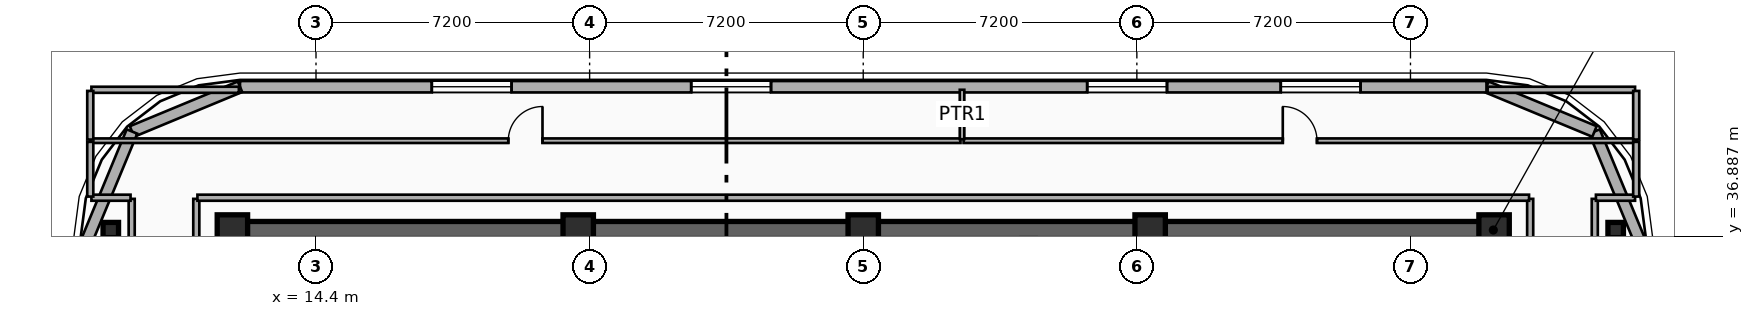
"""IFC4 building model, lengths in metres.
Left out: names, types, materials, properties, quantities, classifications, styles, units other than length and angle.
Written with IfcOpenShell. Run it as: python <this file> out.ifc"""

import sys

from ifc_helpers import new_model, si_unit, direction, frame, frame_2d, origin, origin_2d, place, context, subcontext, project, spatial, rectangle, i_section, extrude, element, fill, save


model = new_model("IFC4")
c1 = context("Model", 3, precision=1e-05, world=origin(), true_north=direction((0.0, 1.0)))
c2 = subcontext(c1, "Body", "Model", "MODEL_VIEW")
j1 = project(units=[si_unit("LENGTHUNIT", "METRE"), si_unit("PLANEANGLEUNIT", "RADIAN")], contexts=[c1])
p1 = place(None, origin())
s1 = spatial("IfcSite", under=j1, at=p1, CompositionType="ELEMENT")
p2 = place(p1, origin())
s2 = spatial("IfcBuilding", under=s1, at=p2, CompositionType="ELEMENT")
p3 = place(p2, frame((0.0, 0.0, 269.5)))
s3 = spatial("IfcBuildingStorey", under=s2, at=p3, CompositionType="ELEMENT", Elevation=269.5)
p4 = place(p3, frame((12.15, 37.05, 0.0), z_axis=(0.0, 0.0, 1.0), x_axis=(1.0, 0.0, 0.0)))
e1 = element("IfcWall", 1, at=p4, inside=s3, PredefinedType="SHEAR", context=c2, shape_type="SweptSolid", body=[
    extrude(rectangle(XDim=33.23, YDim=0.45, at=frame_2d((16.615, 0.0))), origin(), (0.0, 0.0, 1.0), 3.7),
])
for number, where, z_axis, x_axis in (
    (2, (12.2, 37.05, 0.0), (0.0, 0.0, 1.0), (1.0, 0.0, 0.0)),
    (3, (21.3, 37.05, 0.0), (0.0, 0.0, 1.0), (1.0, 0.0, 0.0)),
    (4, (28.8, 37.05, 0.0), (0.0, 0.0, 1.0), (1.0, 0.0, 0.0)),
    (5, (36.35, 37.05, 0.0), (0.0, 0.0, 1.0), (1.0, 0.0, 0.0)),
    (6, (45.4, 37.05, 0.0), (0.0, 0.0, 1.0), (1.0, 0.0, 0.0)),
):
    element("IfcColumn", number, at=place(p3, frame(where, z_axis=z_axis, x_axis=x_axis)), inside=s3, PredefinedType="COLUMN", context=c2, shape_type="SweptSolid", body=[
        extrude(rectangle(XDim=0.8, YDim=0.8, at=origin_2d()), origin(), (0.0, 0.0, 1.0), 3.7),
    ])
for number, where, z_axis, x_axis in (
    (7, (9.0, 37.05, 0.0), (0.0, 0.0, 1.0), (1.0, 0.0, 0.0)),
    (8, (48.6, 37.05, 0.0), (0.0, 0.0, 1.0), (1.0, 0.0, 0.0)),
):
    element("IfcColumn", number, at=place(p3, frame(where, z_axis=z_axis, x_axis=x_axis)), inside=s3, PredefinedType="COLUMN", context=c2, shape_type="SweptSolid", body=[
        extrude(i_section(OverallWidth=0.408, OverallDepth=0.4, WebThickness=0.025, FlangeThickness=0.039, FilletRadius=0.015, at=origin_2d()), origin(), (0.0, 0.0, 1.0), 3.7),
    ])
for number, where, z_axis, x_axis in (
    (9, (48.042, 39.643, 0.0), (0.0, 0.0, 1.0), (0.383, -0.924, 0.0)),
    (10, (45.2, 40.82, 0.0), (0.0, 0.0, 1.0), (0.924, -0.383, 0.0)),
):
    element("IfcWall", number, at=place(p3, frame(where, z_axis=z_axis, x_axis=x_axis)), inside=s3, PredefinedType="SOLIDWALL", context=c2, shape_type="SweptSolid", body=[
        extrude(rectangle(XDim=3.077, YDim=0.3, at=frame_2d((1.538, 0.0))), origin(), (0.0, 0.0, 1.0), 3.42),
    ])
p5 = place(p3, frame((12.4, 40.82, 0.0), z_axis=(0.0, 0.0, 1.0), x_axis=(1.0, 0.0, 0.0)))
e11 = element("IfcWall", 11, at=p5, inside=s3, PredefinedType="SOLIDWALL", context=c2, shape_type="SweptSolid", body=[
    extrude(rectangle(XDim=32.8, YDim=0.3, at=frame_2d((16.4, 0.0))), origin(), (0.0, 0.0, 1.0), 3.42),
])
p6 = place(p5, frame((5.047, 0.0, 0.75)))
e12 = element("IfcOpeningElement", 12, at=p6, cuts=e11, PredefinedType="OPENING", context=c2, shape_type="SweptSolid", body=[
    extrude(rectangle(XDim=2.1, YDim=2.1, at=frame_2d((1.05, 1.05))), frame((0.0, 0.16, 0.0), z_axis=(0.0, -1.0, 0.0), x_axis=(1.0, 0.0, 0.0)), (0.0, 0.0, 1.0), 0.32),
])
p7 = place(p5, frame((11.873, 0.0, 0.75)))
e13 = element("IfcOpeningElement", 13, at=p7, cuts=e11, PredefinedType="OPENING", context=c2, shape_type="SweptSolid", body=[
    extrude(rectangle(XDim=2.1, YDim=2.1, at=frame_2d((1.05, 1.05))), frame((0.0, 0.16, 0.0), z_axis=(0.0, -1.0, 0.0), x_axis=(1.0, 0.0, 0.0)), (0.0, 0.0, 1.0), 0.32),
])
p8 = place(p5, frame((22.293, 0.0, 0.75)))
e14 = element("IfcOpeningElement", 14, at=p8, cuts=e11, PredefinedType="OPENING", context=c2, shape_type="SweptSolid", body=[
    extrude(rectangle(XDim=2.1, YDim=2.1, at=frame_2d((1.05, 1.05))), frame((0.0, 0.16, 0.0), z_axis=(0.0, -1.0, 0.0), x_axis=(1.0, 0.0, 0.0)), (0.0, 0.0, 1.0), 0.32),
])
p9 = place(p5, frame((27.387, 0.0, 0.75)))
e15 = element("IfcOpeningElement", 15, at=p9, cuts=e11, PredefinedType="OPENING", context=c2, shape_type="SweptSolid", body=[
    extrude(rectangle(XDim=2.1, YDim=2.1, at=frame_2d((1.05, 1.05))), frame((0.0, 0.16, 0.0), z_axis=(0.0, -1.0, 0.0), x_axis=(1.0, 0.0, 0.0)), (0.0, 0.0, 1.0), 0.32),
])
for number, where, z_axis, x_axis in (
    (16, (9.557, 39.643, 0.0), (0.0, 0.0, 1.0), (0.924, 0.383, 0.0)),
    (17, (8.38, 36.8, 0.0), (0.0, 0.0, 1.0), (0.383, 0.924, 0.0)),
):
    element("IfcWall", number, at=place(p3, frame(where, z_axis=z_axis, x_axis=x_axis)), inside=s3, PredefinedType="SOLIDWALL", context=c2, shape_type="SweptSolid", body=[
        extrude(rectangle(XDim=3.077, YDim=0.3, at=frame_2d((1.538, 0.0))), origin(), (0.0, 0.0, 1.0), 3.42),
    ])
p10 = place(p3, frame((8.46, 39.4, 0.0), z_axis=(0.0, 0.0, 1.0), x_axis=(1.0, 0.0, 0.0)))
e18 = element("IfcWall", 18, at=p10, inside=s3, PredefinedType="PARTITIONING", context=c2, shape_type="SweptSolid", body=[
    extrude(rectangle(XDim=22.9, YDim=0.12, at=frame_2d((11.45, 0.0))), origin(), (0.0, 0.0, 1.0), 3.42),
])
p11 = place(p10, frame((11.0, 0.0, 0.0)))
e19 = element("IfcOpeningElement", 19, at=p11, cuts=e18, PredefinedType="OPENING", context=c2, shape_type="SweptSolid", body=[
    extrude(rectangle(XDim=0.9, YDim=2.1, at=frame_2d((0.45, 1.05))), frame((0.0, 0.07, 0.0), z_axis=(0.0, -1.0, 0.0), x_axis=(1.0, 0.0, 0.0)), (0.0, 0.0, 1.0), 0.14),
])
p12 = place(p3, frame((31.44, 39.4, 0.0), z_axis=(0.0, 0.0, 1.0), x_axis=(1.0, 0.0, 0.0)))
e20 = element("IfcWall", 20, at=p12, inside=s3, PredefinedType="PARTITIONING", context=c2, shape_type="SweptSolid", body=[
    extrude(rectangle(XDim=17.7, YDim=0.12, at=frame_2d((8.85, 0.0))), origin(), (0.0, 0.0, 1.0), 3.42),
])
p13 = place(p12, frame((8.4, 0.0, 0.0)))
e21 = element("IfcOpeningElement", 21, at=p13, cuts=e20, PredefinedType="OPENING", context=c2, shape_type="SweptSolid", body=[
    extrude(rectangle(XDim=0.9, YDim=2.1, at=frame_2d((0.45, 1.05))), frame((0.0, 0.07, 0.0), z_axis=(0.0, -1.0, 0.0), x_axis=(1.0, 0.0, 0.0)), (0.0, 0.0, 1.0), 0.14),
])
p14 = place(p3, frame((31.4, 39.44, 0.0), z_axis=(0.0, 0.0, 1.0), x_axis=(0.0, 1.0, 0.0)))
e22 = element("IfcWall", 22, at=p14, inside=s3, PredefinedType="PARTITIONING", context=c2, shape_type="SweptSolid", body=[
    extrude(rectangle(XDim=1.3, YDim=0.12, at=frame_2d((0.65, 0.0))), origin(), (0.0, 0.0, 1.0), 3.42),
])
for number, where, z_axis, x_axis in (
    (23, (9.55, 27.63, 0.0), (0.0, 0.0, 1.0), (0.0, 1.0, 0.0)),
    (24, (11.25, 27.63, 0.0), (0.0, 0.0, 1.0), (0.0, 1.0, 0.0)),
    (25, (46.35, 27.63, 0.0), (0.0, 0.0, 1.0), (0.0, 1.0, 0.0)),
    (26, (48.05, 27.63, 0.0), (0.0, 0.0, 1.0), (0.0, 1.0, 0.0)),
):
    element("IfcWall", number, at=place(p3, frame(where, z_axis=z_axis, x_axis=x_axis)), inside=s3, PredefinedType="PARTITIONING", context=c2, shape_type="SweptSolid", body=[
        extrude(rectangle(XDim=10.24, YDim=0.16, at=frame_2d((5.12, 0.0))), origin(), (0.0, 0.0, 1.0), 2.9),
    ])
p15 = place(p3, frame((8.49, 37.9, 0.0), z_axis=(0.0, 0.0, 1.0), x_axis=(1.0, 0.0, 0.0)))
e27 = element("IfcWall", 27, at=p15, inside=s3, PredefinedType="PARTITIONING", context=c2, shape_type="SweptSolid", body=[
    extrude(rectangle(XDim=1.03, YDim=0.16, at=frame_2d((0.515, 0.0))), origin(), (0.0, 0.0, 1.0), 3.42),
])
p16 = place(p3, frame((11.28, 37.9, 0.0), z_axis=(0.0, 0.0, 1.0), x_axis=(1.0, 0.0, 0.0)))
e28 = element("IfcWall", 28, at=p16, inside=s3, PredefinedType="PARTITIONING", context=c2, shape_type="SweptSolid", body=[
    extrude(rectangle(XDim=35.04, YDim=0.16, at=frame_2d((17.52, 0.0))), origin(), (0.0, 0.0, 1.0), 3.42),
])
p17 = place(p3, frame((48.08, 37.9, 0.0), z_axis=(0.0, 0.0, 1.0), x_axis=(1.0, 0.0, 0.0)))
e29 = element("IfcWall", 29, at=p17, inside=s3, PredefinedType="PARTITIONING", context=c2, shape_type="SweptSolid", body=[
    extrude(rectangle(XDim=1.03, YDim=0.16, at=frame_2d((0.515, 0.0))), origin(), (0.0, 0.0, 1.0), 3.42),
])
for number, where, z_axis, x_axis in (
    (30, (8.46, 37.93, 0.0), (0.0, 0.0, 1.0), (0.0, 1.0, 0.0)),
    (31, (49.14, 37.93, 0.0), (0.0, 0.0, 1.0), (0.0, 1.0, 0.0)),
):
    element("IfcWall", number, at=place(p3, frame(where, z_axis=z_axis, x_axis=x_axis)), inside=s3, PredefinedType="PARTITIONING", context=c2, shape_type="SweptSolid", body=[
        extrude(rectangle(XDim=1.44, YDim=0.16, at=frame_2d((0.72, 0.0))), origin(), (0.0, 0.0, 1.0), 3.42),
    ])
p18 = place(p3, frame((8.49, 40.74, 0.0), z_axis=(0.0, 0.0, 1.0), x_axis=(1.0, 0.0, 0.0)))
e32 = element("IfcWall", 32, at=p18, inside=s3, PredefinedType="PARTITIONING", context=c2, shape_type="SweptSolid", body=[
    extrude(rectangle(XDim=3.88, YDim=0.16, at=frame_2d((1.94, 0.0))), origin(), (0.0, 0.0, 1.0), 3.42),
])
p19 = place(p3, frame((8.46, 39.43, 0.0), z_axis=(0.0, 0.0, 1.0), x_axis=(0.0, 1.0, 0.0)))
e33 = element("IfcWall", 33, at=p19, inside=s3, PredefinedType="PARTITIONING", context=c2, shape_type="SweptSolid", body=[
    extrude(rectangle(XDim=1.28, YDim=0.16, at=frame_2d((0.64, 0.0))), origin(), (0.0, 0.0, 1.0), 3.42),
])
p20 = place(p3, frame((45.23, 40.74, 0.0), z_axis=(0.0, 0.0, 1.0), x_axis=(1.0, 0.0, 0.0)))
e34 = element("IfcWall", 34, at=p20, inside=s3, PredefinedType="PARTITIONING", context=c2, shape_type="SweptSolid", body=[
    extrude(rectangle(XDim=3.88, YDim=0.16, at=frame_2d((1.94, 0.0))), origin(), (0.0, 0.0, 1.0), 3.42),
])
p21 = place(p3, frame((49.14, 39.43, 0.0), z_axis=(0.0, 0.0, 1.0), x_axis=(0.0, 1.0, 0.0)))
e35 = element("IfcWall", 35, at=p21, inside=s3, PredefinedType="PARTITIONING", context=c2, shape_type="SweptSolid", body=[
    extrude(rectangle(XDim=1.28, YDim=0.16, at=frame_2d((0.64, 0.0))), origin(), (0.0, 0.0, 1.0), 3.42),
])
p22 = place(p6, origin())
e36 = element("IfcWindow", 36, at=p22, inside=s3, PartitioningType="SINGLE_PANEL", PredefinedType="WINDOW", context=c2, shape_type="SweptSolid", body=[
    extrude(rectangle(XDim=2.1, YDim=2.1, at=frame_2d((1.05, 1.05))), frame((0.0, 0.03, 0.0), z_axis=(0.0, -1.0, 0.0), x_axis=(1.0, 0.0, 0.0)), (0.0, 0.0, 1.0), 0.06),
])
fill(e12, e36)
p23 = place(p7, origin())
e37 = element("IfcWindow", 37, at=p23, inside=s3, PartitioningType="SINGLE_PANEL", PredefinedType="WINDOW", context=c2, shape_type="SweptSolid", body=[
    extrude(rectangle(XDim=2.1, YDim=2.1, at=frame_2d((1.05, 1.05))), frame((0.0, 0.03, 0.0), z_axis=(0.0, -1.0, 0.0), x_axis=(1.0, 0.0, 0.0)), (0.0, 0.0, 1.0), 0.06),
])
fill(e13, e37)
p24 = place(p8, origin())
e38 = element("IfcWindow", 38, at=p24, inside=s3, PartitioningType="SINGLE_PANEL", PredefinedType="WINDOW", context=c2, shape_type="SweptSolid", body=[
    extrude(rectangle(XDim=2.1, YDim=2.1, at=frame_2d((1.05, 1.05))), frame((0.0, 0.03, 0.0), z_axis=(0.0, -1.0, 0.0), x_axis=(1.0, 0.0, 0.0)), (0.0, 0.0, 1.0), 0.06),
])
fill(e14, e38)
p25 = place(p9, origin())
e39 = element("IfcWindow", 39, at=p25, inside=s3, PartitioningType="SINGLE_PANEL", PredefinedType="WINDOW", context=c2, shape_type="SweptSolid", body=[
    extrude(rectangle(XDim=2.1, YDim=2.1, at=frame_2d((1.05, 1.05))), frame((0.0, 0.03, 0.0), z_axis=(0.0, -1.0, 0.0), x_axis=(1.0, 0.0, 0.0)), (0.0, 0.0, 1.0), 0.06),
])
fill(e15, e39)
p26 = place(p11, origin())
e40 = element("IfcDoor", 40, at=p26, inside=s3, OperationType="SINGLE_SWING_RIGHT", PredefinedType="DOOR", context=c2, shape_type="SweptSolid", body=[
    extrude(rectangle(XDim=0.9, YDim=2.1, at=frame_2d((0.45, 1.05))), frame((0.0, 0.025, 0.0), z_axis=(0.0, -1.0, 0.0), x_axis=(1.0, 0.0, 0.0)), (0.0, 0.0, 1.0), 0.05),
])
fill(e19, e40)
p27 = place(p13, origin())
e41 = element("IfcDoor", 41, at=p27, inside=s3, OperationType="SINGLE_SWING_LEFT", PredefinedType="DOOR", context=c2, shape_type="SweptSolid", body=[
    extrude(rectangle(XDim=0.9, YDim=2.1, at=frame_2d((0.45, 1.05))), frame((0.0, 0.025, 0.0), z_axis=(0.0, -1.0, 0.0), x_axis=(1.0, 0.0, 0.0)), (0.0, 0.0, 1.0), 0.05),
])
fill(e21, e41)
save(model, sys.argv[1])
